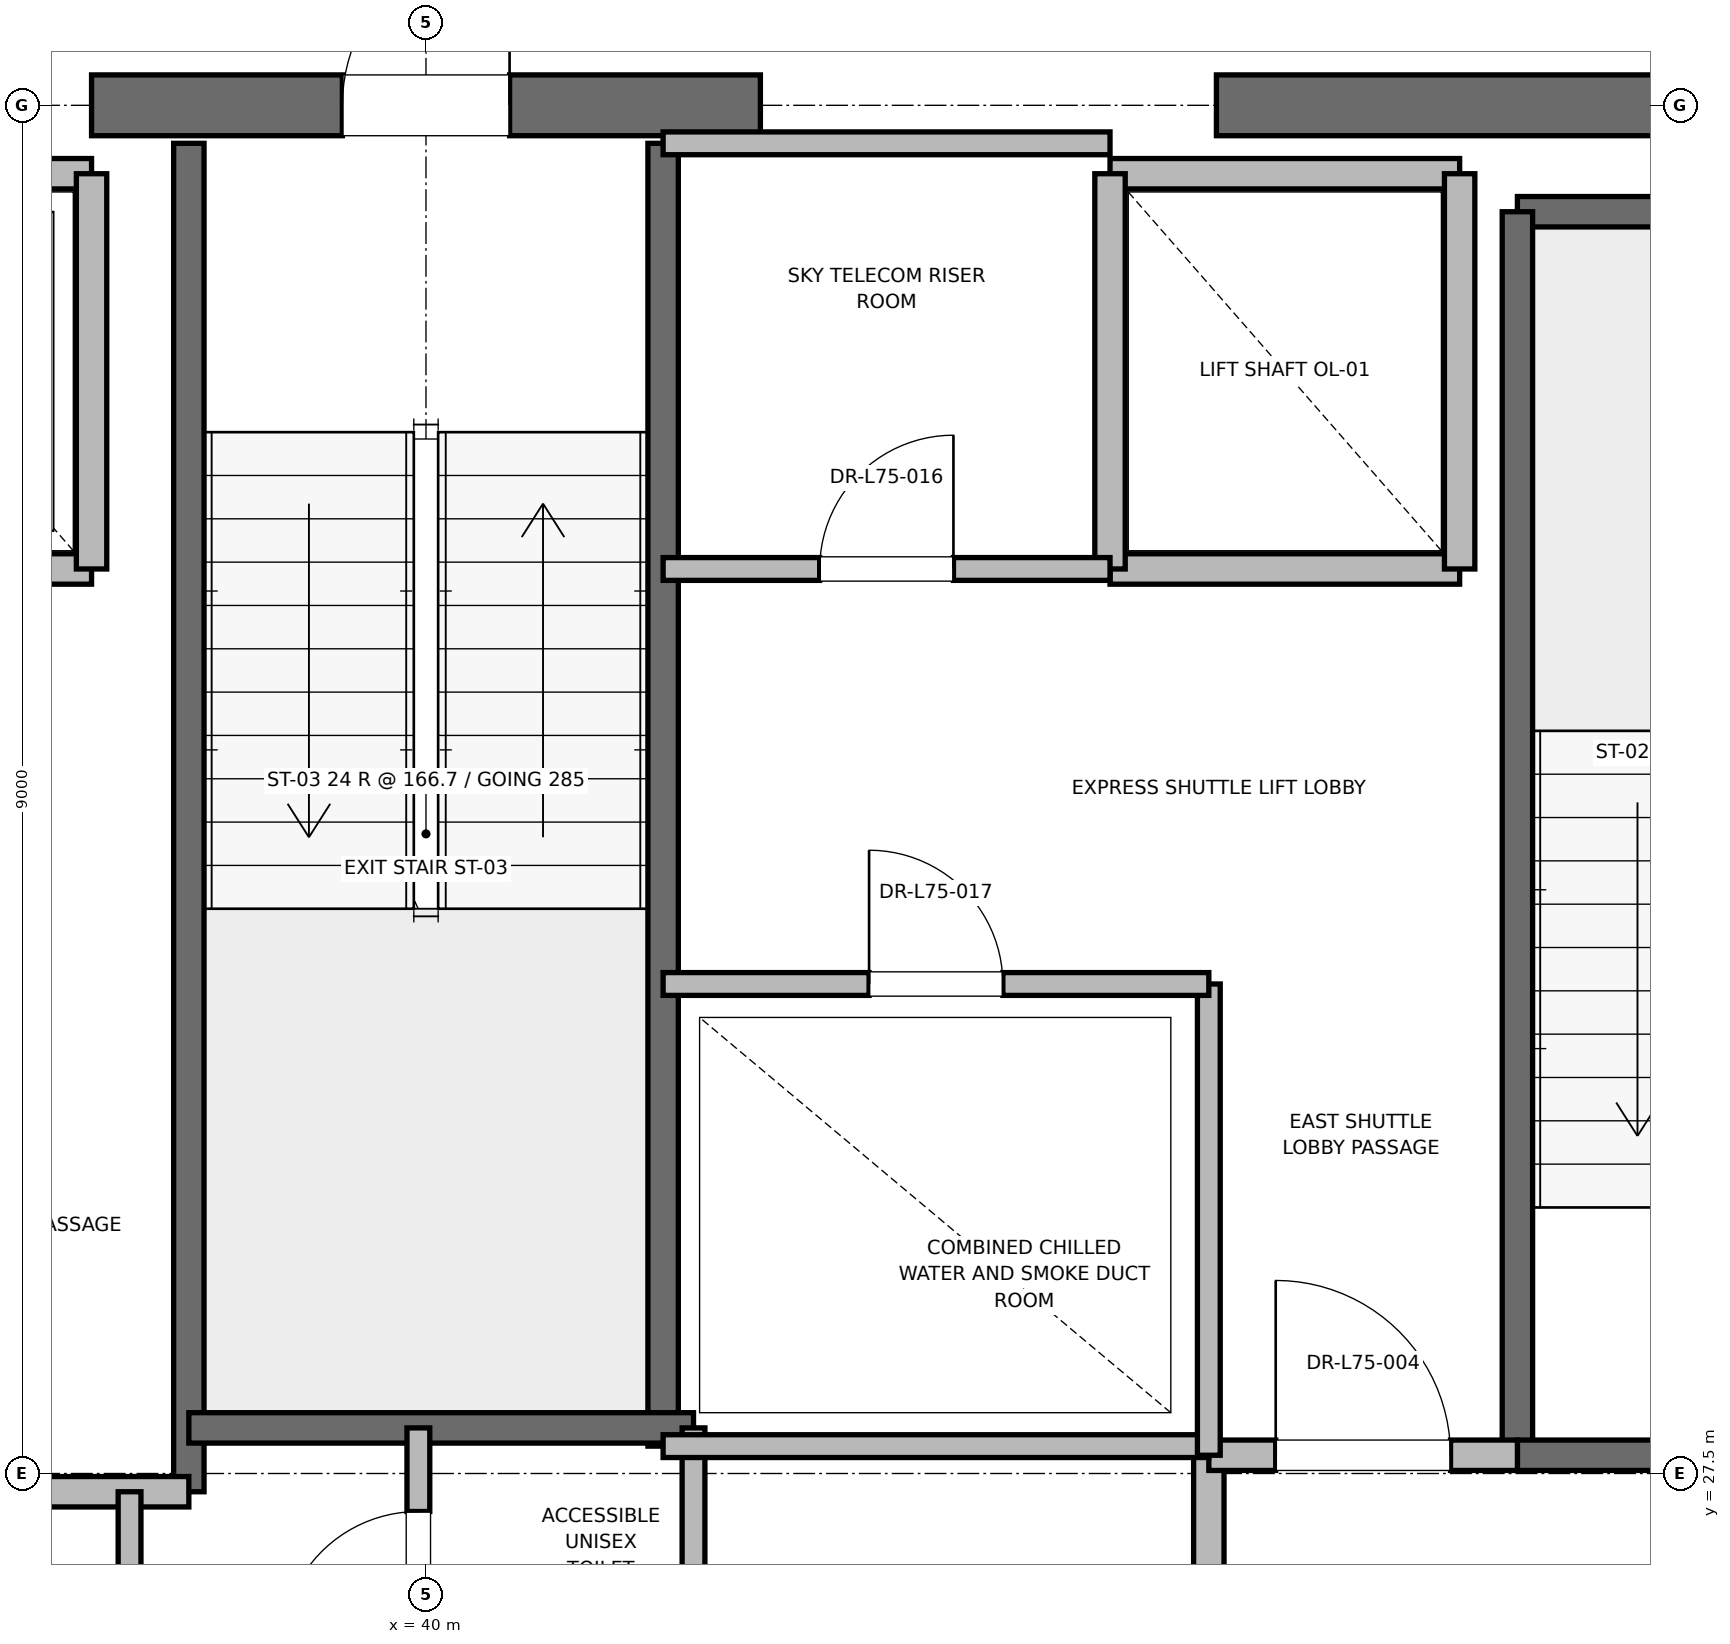
"""IFC4 building model, lengths in metres.
Left out: names, types, materials, properties, quantities, classifications, styles, units other than length and angle.
Written with IfcOpenShell. Run it as: python <this file> out.ifc"""

import sys

from ifc_helpers import new_model, si_unit, direction, frame, frame_2d, origin, place, context, subcontext, project, spatial, rectangle, extrude, element, fill, save


model = new_model("IFC4")
c1 = context("Model", 3, precision=1e-05, world=origin(), true_north=direction((0.0, 1.0)))
c2 = subcontext(c1, "Body", "Model", "MODEL_VIEW")
j1 = project(units=[si_unit("LENGTHUNIT", "METRE"), si_unit("PLANEANGLEUNIT", "RADIAN")], contexts=[c1])
p1 = place(None, origin())
s1 = spatial("IfcSite", under=j1, at=p1, CompositionType="ELEMENT")
p2 = place(p1, origin())
s2 = spatial("IfcBuilding", under=s1, at=p2, CompositionType="ELEMENT")
p3 = place(p2, frame((0.0, 0.0, 322.8)))
s3 = spatial("IfcBuildingStorey", under=s2, at=p3, CompositionType="ELEMENT", Elevation=322.8)
p4 = place(p3, frame((37.8, 36.5, 0.0), z_axis=(0.0, 0.0, 1.0), x_axis=(1.0, 0.0, 0.0)))
e1 = element("IfcWall", 1, at=p4, inside=s3, PredefinedType="SHEAR", context=c2, shape_type="SweptSolid", body=[
    extrude(rectangle(XDim=4.4, YDim=0.4, at=frame_2d((2.2, 0.0))), origin(), (0.0, 0.0, 1.0), 3.785),
])
p5 = place(p4, frame((1.65, 0.0, 0.0)))
e2 = element("IfcOpeningElement", 2, at=p5, cuts=e1, PredefinedType="OPENING", context=c2, shape_type="SweptSolid", body=[
    extrude(rectangle(XDim=1.1, YDim=2.15, at=frame_2d((0.55, 1.075))), frame((0.0, 0.2, 0.0), z_axis=(0.0, -1.0, 0.0), x_axis=(1.0, 0.0, 0.0)), (0.0, 0.0, 1.0), 0.4),
])
p6 = place(p3, frame((45.2, 36.5, 0.0), z_axis=(0.0, 0.0, 1.0), x_axis=(1.0, 0.0, 0.0)))
e3 = element("IfcWall", 3, at=p6, inside=s3, PredefinedType="SHEAR", context=c2, shape_type="SweptSolid", body=[
    extrude(rectangle(XDim=5.8, YDim=0.4, at=frame_2d((2.9, 0.0))), origin(), (0.0, 0.0, 1.0), 3.785),
])
p7 = place(p3, frame((47.18, 35.8, 0.0), z_axis=(0.0, 0.0, 1.0), x_axis=(1.0, 0.0, 0.0)))
e4 = element("IfcWall", 4, at=p7, inside=s3, PredefinedType="SOLIDWALL", context=c2, shape_type="SweptSolid", body=[
    extrude(rectangle(XDim=3.12, YDim=0.2, at=frame_2d((1.56, 0.0))), origin(), (0.0, 0.0, 1.0), 3.785),
])
p8 = place(p3, frame((47.18, 27.62, 0.0), z_axis=(0.0, 0.0, 1.0), x_axis=(0.0, 1.0, 0.0)))
e5 = element("IfcWall", 5, at=p8, inside=s3, PredefinedType="SOLIDWALL", context=c2, shape_type="SweptSolid", body=[
    extrude(rectangle(XDim=8.18, YDim=0.2, at=frame_2d((4.09, 0.0))), origin(), (0.0, 0.0, 1.0), 3.785),
])
p9 = place(p3, frame((47.18, 27.62, 0.0), z_axis=(0.0, 0.0, 1.0), x_axis=(1.0, 0.0, 0.0)))
e6 = element("IfcWall", 6, at=p9, inside=s3, PredefinedType="SOLIDWALL", context=c2, shape_type="SweptSolid", body=[
    extrude(rectangle(XDim=3.12, YDim=0.2, at=frame_2d((1.56, 0.0))), origin(), (0.0, 0.0, 1.0), 3.785),
])
p10 = place(p9, frame((1.01, 0.0, 0.0)))
e7 = element("IfcOpeningElement", 7, at=p10, cuts=e6, PredefinedType="OPENING", context=c2, shape_type="SweptSolid", body=[
    extrude(rectangle(XDim=1.1, YDim=2.15, at=frame_2d((0.55, 1.075))), frame((0.0, 0.1, 0.0), z_axis=(0.0, -1.0, 0.0), x_axis=(1.0, 0.0, 0.0)), (0.0, 0.0, 1.0), 0.2),
])
p11 = place(p3, frame((38.44, 27.38, 0.0), z_axis=(0.0, 0.0, 1.0), x_axis=(0.0, 1.0, 0.0)))
e8 = element("IfcWall", 8, at=p11, inside=s3, PredefinedType="SOLIDWALL", context=c2, shape_type="SweptSolid", body=[
    extrude(rectangle(XDim=8.87, YDim=0.2, at=frame_2d((4.435, 0.0))), origin(), (0.0, 0.0, 1.0), 3.785),
])
p12 = place(p3, frame((41.56, 27.68, 0.0), z_axis=(0.0, 0.0, 1.0), x_axis=(0.0, 1.0, 0.0)))
e9 = element("IfcWall", 9, at=p12, inside=s3, PredefinedType="SOLIDWALL", context=c2, shape_type="SweptSolid", body=[
    extrude(rectangle(XDim=8.57, YDim=0.2, at=frame_2d((4.285, 0.0))), origin(), (0.0, 0.0, 1.0), 3.785),
])
p13 = place(p3, frame((38.44, 27.8, 0.0), z_axis=(0.0, 0.0, 1.0), x_axis=(1.0, 0.0, 0.0)))
e10 = element("IfcWall", 10, at=p13, inside=s3, PredefinedType="SOLIDWALL", context=c2, shape_type="SweptSolid", body=[
    extrude(rectangle(XDim=3.32, YDim=0.2, at=frame_2d((1.66, 0.0))), origin(), (0.0, 0.0, 1.0), 3.785),
])
p14 = place(p3, frame((32.82, 27.38, 0.0), z_axis=(0.0, 0.0, 1.0), x_axis=(1.0, 0.0, 0.0)))
e11 = element("IfcWall", 11, at=p14, inside=s3, PredefinedType="PARTITIONING", context=c2, shape_type="SweptSolid", body=[
    extrude(rectangle(XDim=5.62, YDim=0.2, at=frame_2d((2.81, 0.0))), origin(), (0.0, 0.0, 1.0), 3.785),
])
p15 = place(p3, frame((45.15, 24.25, 0.0), z_axis=(0.0, 0.0, 1.0), x_axis=(0.0, 1.0, 0.0)))
e12 = element("IfcWall", 12, at=p15, inside=s3, PredefinedType="PARTITIONING", context=c2, shape_type="SweptSolid", body=[
    extrude(rectangle(XDim=3.37, YDim=0.2, at=frame_2d((1.685, 0.0))), origin(), (0.0, 0.0, 1.0), 3.785),
])
p16 = place(p3, frame((45.15, 27.62, 0.0), z_axis=(0.0, 0.0, 1.0), x_axis=(1.0, 0.0, 0.0)))
e13 = element("IfcWall", 13, at=p16, inside=s3, PredefinedType="PARTITIONING", context=c2, shape_type="SweptSolid", body=[
    extrude(rectangle(XDim=2.03, YDim=0.2, at=frame_2d((1.015, 0.0))), origin(), (0.0, 0.0, 1.0), 3.785),
])
p17 = place(p16, frame((0.44, 0.0, 0.0)))
e14 = element("IfcOpeningElement", 14, at=p17, cuts=e13, PredefinedType="OPENING", context=c2, shape_type="SweptSolid", body=[
    extrude(rectangle(XDim=1.15, YDim=2.2, at=frame_2d((0.575, 1.1))), frame((0.0, 0.1, 0.0), z_axis=(0.0, -1.0, 0.0), x_axis=(1.0, 0.0, 0.0)), (0.0, 0.0, 1.0), 0.2),
])
p18 = place(p3, frame((35.5, 33.45, 0.0), z_axis=(0.0, 0.0, 1.0), x_axis=(1.0, 0.0, 0.0)))
e15 = element("IfcWall", 15, at=p18, inside=s3, PredefinedType="SOLIDWALL", context=c2, shape_type="SweptSolid", body=[
    extrude(rectangle(XDim=2.3, YDim=0.2, at=frame_2d((1.15, 0.0))), origin(), (0.0, 0.0, 1.0), 3.785),
])
p19 = place(p18, frame((0.6, 0.0, 0.0)))
e16 = element("IfcOpeningElement", 16, at=p19, cuts=e15, PredefinedType="OPENING", context=c2, shape_type="SweptSolid", body=[
    extrude(rectangle(XDim=1.1, YDim=2.2, at=frame_2d((0.55, 1.1))), frame((0.0, 0.1, 0.0), z_axis=(0.0, -1.0, 0.0), x_axis=(1.0, 0.0, 0.0)), (0.0, 0.0, 1.0), 0.2),
])
p20 = place(p3, frame((37.8, 36.05, 0.0), z_axis=(0.0, 0.0, 1.0), x_axis=(-1.0, 0.0, 0.0)))
e17 = element("IfcWall", 17, at=p20, inside=s3, PredefinedType="SOLIDWALL", context=c2, shape_type="SweptSolid", body=[
    extrude(rectangle(XDim=2.3, YDim=0.2, at=frame_2d((1.15, 0.0))), origin(), (0.0, 0.0, 1.0), 2.865),
])
p21 = place(p3, frame((37.8, 33.45, 0.0), z_axis=(0.0, 0.0, 1.0), x_axis=(0.0, 1.0, 0.0)))
e18 = element("IfcWall", 18, at=p21, inside=s3, PredefinedType="SOLIDWALL", context=c2, shape_type="SweptSolid", body=[
    extrude(rectangle(XDim=2.6, YDim=0.2, at=frame_2d((1.3, 0.0))), origin(), (0.0, 0.0, 1.0), 2.865),
])
p22 = place(p3, frame((44.5, 33.45, 0.0), z_axis=(0.0, 0.0, 1.0), x_axis=(1.0, 0.0, 0.0)))
e19 = element("IfcWall", 19, at=p22, inside=s3, PredefinedType="SOLIDWALL", context=c2, shape_type="SweptSolid", body=[
    extrude(rectangle(XDim=2.3, YDim=0.2, at=frame_2d((1.15, 0.0))), origin(), (0.0, 0.0, 1.0), 3.785),
])
p23 = place(p3, frame((46.8, 36.05, 0.0), z_axis=(0.0, 0.0, 1.0), x_axis=(-1.0, 0.0, 0.0)))
e20 = element("IfcWall", 20, at=p23, inside=s3, PredefinedType="SOLIDWALL", context=c2, shape_type="SweptSolid", body=[
    extrude(rectangle(XDim=2.3, YDim=0.2, at=frame_2d((1.15, 0.0))), origin(), (0.0, 0.0, 1.0), 2.865),
])
p24 = place(p3, frame((44.5, 36.05, 0.0), z_axis=(0.0, 0.0, 1.0), x_axis=(0.0, -1.0, 0.0)))
e21 = element("IfcWall", 21, at=p24, inside=s3, PredefinedType="SOLIDWALL", context=c2, shape_type="SweptSolid", body=[
    extrude(rectangle(XDim=2.6, YDim=0.2, at=frame_2d((1.3, 0.0))), origin(), (0.0, 0.0, 1.0), 2.865),
])
p25 = place(p3, frame((46.8, 33.45, 0.0), z_axis=(0.0, 0.0, 1.0), x_axis=(0.0, 1.0, 0.0)))
e22 = element("IfcWall", 22, at=p25, inside=s3, PredefinedType="SOLIDWALL", context=c2, shape_type="SweptSolid", body=[
    extrude(rectangle(XDim=2.6, YDim=0.2, at=frame_2d((1.3, 0.0))), origin(), (0.0, 0.0, 1.0), 3.785),
])
p26 = place(p3, frame((41.76, 23.8, 0.0), z_axis=(0.0, 0.0, 1.0), x_axis=(0.0, 1.0, 0.0)))
e23 = element("IfcWall", 23, at=p26, inside=s3, PredefinedType="PARTITIONING", context=c2, shape_type="SweptSolid", body=[
    extrude(rectangle(XDim=4.0, YDim=0.15, at=frame_2d((2.0, 0.0))), origin(), (0.0, 0.0, 1.0), 2.85),
])
p27 = place(p3, frame((39.95, 25.8, 0.0), z_axis=(0.0, 0.0, 1.0), x_axis=(0.0, 1.0, 0.0)))
e24 = element("IfcWall", 24, at=p27, inside=s3, PredefinedType="PARTITIONING", context=c2, shape_type="SweptSolid", body=[
    extrude(rectangle(XDim=2.0, YDim=0.15, at=frame_2d((1.0, 0.0))), origin(), (0.0, 0.0, 1.0), 2.85),
])
p28 = place(p27, frame((0.55, 0.0, 0.0)))
e25 = element("IfcOpeningElement", 25, at=p28, cuts=e24, PredefinedType="OPENING", context=c2, shape_type="SweptSolid", body=[
    extrude(rectangle(XDim=0.9, YDim=2.1, at=frame_2d((0.45, 1.05))), frame((0.0, 0.075, 0.0), z_axis=(0.0, -1.0, 0.0), x_axis=(1.0, 0.0, 0.0)), (0.0, 0.0, 1.0), 0.15),
])
p29 = place(p3, frame((38.05, 18.6, 0.0), z_axis=(0.0, 0.0, 1.0), x_axis=(0.0, 1.0, 0.0)))
e26 = element("IfcWall", 26, at=p29, inside=s3, PredefinedType="PARTITIONING", context=c2, shape_type="SweptSolid", body=[
    extrude(rectangle(XDim=8.78, YDim=0.15, at=frame_2d((4.39, 0.0))), origin(), (0.0, 0.0, 1.0), 2.85),
])
p30 = place(p29, frame((3.89, 0.0, 0.0)))
e27 = element("IfcOpeningElement", 27, at=p30, cuts=e26, PredefinedType="OPENING", context=c2, shape_type="SweptSolid", body=[
    extrude(rectangle(XDim=1.0, YDim=2.15, at=frame_2d((0.5, 1.075))), frame((0.0, 0.075, 0.0), z_axis=(0.0, -1.0, 0.0), x_axis=(1.0, 0.0, 0.0)), (0.0, 0.0, 1.0), 0.15),
])
p31 = place(p3, frame((41.56, 27.68, 0.0), z_axis=(0.0, 0.0, 1.0), x_axis=(1.0, 0.0, 0.0)))
e28 = element("IfcWall", 28, at=p31, inside=s3, PredefinedType="PARTITIONING", context=c2, shape_type="SweptSolid", body=[
    extrude(rectangle(XDim=3.59, YDim=0.15, at=frame_2d((1.795, 0.0))), origin(), (0.0, 0.0, 1.0), 2.85),
])
p32 = place(p3, frame((45.15, 27.62, 0.0), z_axis=(0.0, 0.0, 1.0), x_axis=(0.0, 1.0, 0.0)))
e29 = element("IfcWall", 29, at=p32, inside=s3, PredefinedType="PARTITIONING", context=c2, shape_type="SweptSolid", body=[
    extrude(rectangle(XDim=3.1, YDim=0.15, at=frame_2d((1.55, 0.0))), origin(), (0.0, 0.0, 1.0), 2.85),
])
p33 = place(p3, frame((41.56, 30.72, 0.0), z_axis=(0.0, 0.0, 1.0), x_axis=(1.0, 0.0, 0.0)))
e30 = element("IfcWall", 30, at=p33, inside=s3, PredefinedType="PARTITIONING", context=c2, shape_type="SweptSolid", body=[
    extrude(rectangle(XDim=3.59, YDim=0.15, at=frame_2d((1.795, 0.0))), origin(), (0.0, 0.0, 1.0), 2.85),
])
p34 = place(p33, frame((1.355, 0.0, 0.0)))
e31 = element("IfcOpeningElement", 31, at=p34, cuts=e30, PredefinedType="OPENING", context=c2, shape_type="SweptSolid", body=[
    extrude(rectangle(XDim=0.88, YDim=2.1, at=frame_2d((0.44, 1.05))), frame((0.0, 0.075, 0.0), z_axis=(0.0, -1.0, 0.0), x_axis=(1.0, 0.0, 0.0)), (0.0, 0.0, 1.0), 0.15),
])
p35 = place(p3, frame((41.56, 36.25, 0.0), z_axis=(0.0, 0.0, 1.0), x_axis=(1.0, 0.0, 0.0)))
e32 = element("IfcWall", 32, at=p35, inside=s3, PredefinedType="PARTITIONING", context=c2, shape_type="SweptSolid", body=[
    extrude(rectangle(XDim=2.94, YDim=0.15, at=frame_2d((1.47, 0.0))), origin(), (0.0, 0.0, 1.0), 2.85),
])
p36 = place(p3, frame((41.56, 33.45, 0.0), z_axis=(0.0, 0.0, 1.0), x_axis=(1.0, 0.0, 0.0)))
e33 = element("IfcWall", 33, at=p36, inside=s3, PredefinedType="PARTITIONING", context=c2, shape_type="SweptSolid", body=[
    extrude(rectangle(XDim=2.94, YDim=0.15, at=frame_2d((1.47, 0.0))), origin(), (0.0, 0.0, 1.0), 2.85),
])
p37 = place(p36, frame((1.03, 0.0, 0.0)))
e34 = element("IfcOpeningElement", 34, at=p37, cuts=e33, PredefinedType="OPENING", context=c2, shape_type="SweptSolid", body=[
    extrude(rectangle(XDim=0.88, YDim=2.1, at=frame_2d((0.44, 1.05))), frame((0.0, 0.075, 0.0), z_axis=(0.0, -1.0, 0.0), x_axis=(1.0, 0.0, 0.0)), (0.0, 0.0, 1.0), 0.15),
])
p38 = place(p5, origin())
e35 = element("IfcDoor", 35, at=p38, inside=s3, OperationType="SINGLE_SWING_RIGHT", PredefinedType="DOOR", context=c2, shape_type="SweptSolid", body=[
    extrude(rectangle(XDim=1.1, YDim=2.15, at=frame_2d((0.55, 1.075))), frame((0.0, 0.025, 0.0), z_axis=(0.0, -1.0, 0.0), x_axis=(1.0, 0.0, 0.0)), (0.0, 0.0, 1.0), 0.05),
])
fill(e2, e35)
p39 = place(p17, origin())
e36 = element("IfcDoor", 36, at=p39, inside=s3, OperationType="SINGLE_SWING_LEFT", PredefinedType="DOOR", context=c2, shape_type="SweptSolid", body=[
    extrude(rectangle(XDim=1.15, YDim=2.2, at=frame_2d((0.575, 1.1))), frame((0.0, 0.025, 0.0), z_axis=(0.0, -1.0, 0.0), x_axis=(1.0, 0.0, 0.0)), (0.0, 0.0, 1.0), 0.05),
])
fill(e14, e36)
p40 = place(p28, origin())
e37 = element("IfcDoor", 37, at=p40, inside=s3, OperationType="SINGLE_SWING_LEFT", PredefinedType="DOOR", context=c2, shape_type="SweptSolid", body=[
    extrude(rectangle(XDim=0.9, YDim=2.1, at=frame_2d((0.45, 1.05))), frame((0.0, 0.025, 0.0), z_axis=(0.0, -1.0, 0.0), x_axis=(1.0, 0.0, 0.0)), (0.0, 0.0, 1.0), 0.05),
])
fill(e25, e37)
p41 = place(p34, origin())
e38 = element("IfcDoor", 38, at=p41, inside=s3, OperationType="SINGLE_SWING_LEFT", PredefinedType="DOOR", context=c2, shape_type="SweptSolid", body=[
    extrude(rectangle(XDim=0.88, YDim=2.1, at=frame_2d((0.44, 1.05))), frame((0.0, 0.025, 0.0), z_axis=(0.0, -1.0, 0.0), x_axis=(1.0, 0.0, 0.0)), (0.0, 0.0, 1.0), 0.05),
])
fill(e31, e38)
p42 = place(p37, origin())
e39 = element("IfcDoor", 39, at=p42, inside=s3, OperationType="SINGLE_SWING_RIGHT", PredefinedType="DOOR", context=c2, shape_type="SweptSolid", body=[
    extrude(rectangle(XDim=0.88, YDim=2.1, at=frame_2d((0.44, 1.05))), frame((0.0, 0.025, 0.0), z_axis=(0.0, -1.0, 0.0), x_axis=(1.0, 0.0, 0.0)), (0.0, 0.0, 1.0), 0.05),
])
fill(e34, e39)
save(model, sys.argv[1])
